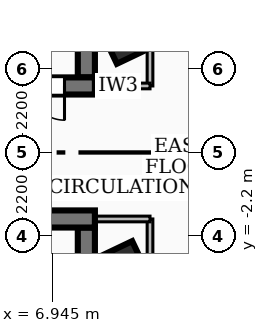
"""IFC4 building model, lengths in metres.
Left out: names, types, materials, properties, quantities, classifications, styles, units other than length and angle.
Written with IfcOpenShell. Run it as: python <this file> out.ifc"""

import sys

from ifc_helpers import new_model, si_unit, direction, frame, frame_2d, origin, origin_2d, place, context, subcontext, project, spatial, rectangle, extrude, element, fill, save


model = new_model("IFC4")
c1 = context("Model", 3, precision=1e-05, world=origin(), true_north=direction((0.0, 1.0)))
c2 = subcontext(c1, "Body", "Model", "MODEL_VIEW")
j1 = project(units=[si_unit("LENGTHUNIT", "METRE"), si_unit("PLANEANGLEUNIT", "RADIAN")], contexts=[c1])
p1 = place(None, origin())
s1 = spatial("IfcSite", under=j1, at=p1, CompositionType="ELEMENT")
p2 = place(p1, origin())
s2 = spatial("IfcBuilding", under=s1, at=p2, CompositionType="ELEMENT")
p3 = place(p2, frame((0.0, 0.0, 188.28)))
s3 = spatial("IfcBuildingStorey", under=s2, at=p3, CompositionType="ELEMENT", Elevation=188.28)
p4 = place(p3, frame((8.07, 1.75, 0.0), z_axis=(0.0, 0.0, 1.0), x_axis=(-1.0, 0.0, 0.0)))
e1 = element("IfcWall", 1, at=p4, inside=s3, PredefinedType="SHEAR", context=c2, shape_type="SweptSolid", body=[
    extrude(rectangle(XDim=16.14, YDim=0.45, at=frame_2d((8.07, 0.0))), origin(), (0.0, 0.0, 1.0), 4.06),
])
p5 = place(p4, frame((7.45, 0.0, 0.0)))
e2 = element("IfcOpeningElement", 2, at=p5, cuts=e1, PredefinedType="OPENING", context=c2, shape_type="SweptSolid", body=[
    extrude(rectangle(XDim=1.0, YDim=2.1, at=frame_2d((0.5, 1.05))), frame((0.0, 0.235, 0.0), z_axis=(0.0, -1.0, 0.0), x_axis=(1.0, 0.0, 0.0)), (0.0, 0.0, 1.0), 0.47),
])
p6 = place(p4, frame((3.85, 0.0, 0.0)))
e3 = element("IfcOpeningElement", 3, at=p6, cuts=e1, PredefinedType="OPENING", context=c2, shape_type="SweptSolid", body=[
    extrude(rectangle(XDim=0.9, YDim=2.06, at=frame_2d((0.45, 1.03))), frame((0.0, 0.235, 0.0), z_axis=(0.0, -1.0, 0.0), x_axis=(1.0, 0.0, 0.0)), (0.0, 0.0, 1.0), 0.47),
])
p7 = place(p4, frame((2.35, 0.0, 0.0)))
e4 = element("IfcOpeningElement", 4, at=p7, cuts=e1, PredefinedType="OPENING", context=c2, shape_type="SweptSolid", body=[
    extrude(rectangle(XDim=0.9, YDim=2.06, at=frame_2d((0.45, 1.03))), frame((0.0, 0.235, 0.0), z_axis=(0.0, -1.0, 0.0), x_axis=(1.0, 0.0, 0.0)), (0.0, 0.0, 1.0), 0.47),
])
p8 = place(p4, frame((0.8, 0.0, 0.0)))
e5 = element("IfcOpeningElement", 5, at=p8, cuts=e1, PredefinedType="OPENING", context=c2, shape_type="SweptSolid", body=[
    extrude(rectangle(XDim=0.9, YDim=2.06, at=frame_2d((0.45, 1.03))), frame((0.0, 0.235, 0.0), z_axis=(0.0, -1.0, 0.0), x_axis=(1.0, 0.0, 0.0)), (0.0, 0.0, 1.0), 0.47),
])
p9 = place(p3, frame((7.845, 8.31, 0.0), z_axis=(0.0, 0.0, 1.0), x_axis=(0.0, -1.0, 0.0)))
e6 = element("IfcWall", 6, at=p9, inside=s3, PredefinedType="SHEAR", context=c2, shape_type="SweptSolid", body=[
    extrude(rectangle(XDim=6.335, YDim=0.45, at=frame_2d((3.167, 0.0))), origin(), (0.0, 0.0, 1.0), 4.06),
])
p10 = place(p3, frame((-8.07, -1.75, 0.0), z_axis=(0.0, 0.0, 1.0), x_axis=(1.0, 0.0, 0.0)))
e7 = element("IfcWall", 7, at=p10, inside=s3, PredefinedType="SHEAR", context=c2, shape_type="SweptSolid", body=[
    extrude(rectangle(XDim=16.14, YDim=0.45, at=frame_2d((8.07, 0.0))), origin(), (0.0, 0.0, 1.0), 4.06),
])
p11 = place(p10, frame((7.45, 0.0, 0.0)))
e8 = element("IfcOpeningElement", 8, at=p11, cuts=e7, PredefinedType="OPENING", context=c2, shape_type="SweptSolid", body=[
    extrude(rectangle(XDim=1.0, YDim=2.1, at=frame_2d((0.5, 1.05))), frame((0.0, 0.235, 0.0), z_axis=(0.0, -1.0, 0.0), x_axis=(1.0, 0.0, 0.0)), (0.0, 0.0, 1.0), 0.47),
])
p12 = place(p10, frame((12.65, 0.0, 0.0)))
e9 = element("IfcOpeningElement", 9, at=p12, cuts=e7, PredefinedType="OPENING", context=c2, shape_type="SweptSolid", body=[
    extrude(rectangle(XDim=0.9, YDim=2.06, at=frame_2d((0.45, 1.03))), frame((0.0, 0.235, 0.0), z_axis=(0.0, -1.0, 0.0), x_axis=(1.0, 0.0, 0.0)), (0.0, 0.0, 1.0), 0.47),
])
p13 = place(p10, frame((0.565, 0.0, 0.0)))
e10 = element("IfcOpeningElement", 10, at=p13, cuts=e7, PredefinedType="OPENING", context=c2, shape_type="SweptSolid", body=[
    extrude(rectangle(XDim=1.05, YDim=2.15, at=frame_2d((0.525, 1.075))), frame((0.0, 0.235, 0.0), z_axis=(0.0, -1.0, 0.0), x_axis=(1.0, 0.0, 0.0)), (0.0, 0.0, 1.0), 0.47),
])
p14 = place(p10, frame((2.125, 0.0, 0.0)))
e11 = element("IfcOpeningElement", 11, at=p14, cuts=e7, PredefinedType="OPENING", context=c2, shape_type="SweptSolid", body=[
    extrude(rectangle(XDim=1.05, YDim=2.15, at=frame_2d((0.525, 1.075))), frame((0.0, 0.235, 0.0), z_axis=(0.0, -1.0, 0.0), x_axis=(1.0, 0.0, 0.0)), (0.0, 0.0, 1.0), 0.47),
])
p15 = place(p10, frame((3.685, 0.0, 0.0)))
e12 = element("IfcOpeningElement", 12, at=p15, cuts=e7, PredefinedType="OPENING", context=c2, shape_type="SweptSolid", body=[
    extrude(rectangle(XDim=1.05, YDim=2.15, at=frame_2d((0.525, 1.075))), frame((0.0, 0.235, 0.0), z_axis=(0.0, -1.0, 0.0), x_axis=(1.0, 0.0, 0.0)), (0.0, 0.0, 1.0), 0.47),
])
p16 = place(p3, frame((7.845, -1.975, 0.0), z_axis=(0.0, 0.0, 1.0), x_axis=(0.0, -1.0, 0.0)))
e13 = element("IfcWall", 13, at=p16, inside=s3, PredefinedType="SHEAR", context=c2, shape_type="SweptSolid", body=[
    extrude(rectangle(XDim=6.335, YDim=0.45, at=frame_2d((3.167, 0.0))), origin(), (0.0, 0.0, 1.0), 4.06),
])
for number, where, z_axis, x_axis in (
    (14, (8.85, -2.9, 0.0), (0.0, 0.0, 1.0), (0.903, 0.43, 0.0)),
    (15, (8.85, 2.9, 0.0), (0.0, 0.0, 1.0), (0.903, 0.43, 0.0)),
):
    element("IfcColumn", number, at=place(p3, frame(where, z_axis=z_axis, x_axis=x_axis)), inside=s3, PredefinedType="COLUMN", context=c2, shape_type="SweptSolid", body=[
        extrude(rectangle(XDim=0.85, YDim=0.85, at=origin_2d()), origin(), (0.0, 0.0, 1.0), 4.32),
    ])
p17 = place(p3, frame((9.52, 1.75, 0.0), z_axis=(0.0, 0.0, 1.0), x_axis=(0.0, 1.0, 0.0)))
e16 = element("IfcWall", 16, at=p17, inside=s3, PredefinedType="PARTITIONING", context=c2, shape_type="SweptSolid", body=[
    extrude(rectangle(XDim=6.63, YDim=0.15, at=frame_2d((3.315, 0.0))), origin(), (0.0, 0.0, 1.0), 3.364),
])
p18 = place(p3, frame((7.85, 1.75, 0.0), z_axis=(0.0, 0.0, 1.0), x_axis=(1.0, 0.0, 0.0)))
e17 = element("IfcWall", 17, at=p18, inside=s3, PredefinedType="PARTITIONING", context=c2, shape_type="SweptSolid", body=[
    extrude(rectangle(XDim=1.67, YDim=0.15, at=frame_2d((0.835, 0.0))), origin(), (0.0, 0.0, 1.0), 3.29),
])
p19 = place(p3, frame((9.52, -8.38, 0.0), z_axis=(0.0, 0.0, 1.0), x_axis=(0.0, 1.0, 0.0)))
e18 = element("IfcWall", 18, at=p19, inside=s3, PredefinedType="PARTITIONING", context=c2, shape_type="SweptSolid", body=[
    extrude(rectangle(XDim=6.63, YDim=0.15, at=frame_2d((3.315, 0.0))), origin(), (0.0, 0.0, 1.0), 4.06),
])
p20 = place(p3, frame((7.85, -1.75, 0.0), z_axis=(0.0, 0.0, 1.0), x_axis=(1.0, 0.0, 0.0)))
e19 = element("IfcWall", 19, at=p20, inside=s3, PredefinedType="PARTITIONING", context=c2, shape_type="SweptSolid", body=[
    extrude(rectangle(XDim=1.67, YDim=0.15, at=frame_2d((0.835, 0.0))), origin(), (0.0, 0.0, 1.0), 3.29),
])
p21 = place(p3, frame((8.362, 15.677, 0.0), z_axis=(0.0, 0.0, 1.0), x_axis=(0.429924831179, -0.902864685064, 0.0)))
e20 = element("IfcWall", 20, at=p21, inside=s3, PredefinedType="PARTITIONING", context=c2, shape_type="SweptSolid", body=[
    extrude(rectangle(XDim=20.58, YDim=0.1, at=frame_2d((10.29, 0.0))), origin(), (0.0, 0.0, 1.0), 3.364),
])
p22 = place(p21, frame((9.96, 0.0, 0.0)))
e21 = element("IfcOpeningElement", 21, at=p22, cuts=e20, PredefinedType="OPENING", context=c2, shape_type="SweptSolid", body=[
    extrude(rectangle(XDim=1.2, YDim=2.1, at=frame_2d((0.6, 1.05))), frame((0.0, 0.06, 0.0), z_axis=(0.0, -1.0, 0.0), x_axis=(1.0, 0.0, 0.0)), (0.0, 0.0, 1.0), 0.12),
])
p23 = place(p8, origin())
e22 = element("IfcDoor", 22, at=p23, inside=s3, OperationType="SINGLE_SWING_LEFT", PredefinedType="DOOR", context=c2, shape_type="SweptSolid", body=[
    extrude(rectangle(XDim=0.9, YDim=2.06, at=frame_2d((0.45, 1.03))), frame((0.0, 0.025, 0.0), z_axis=(0.0, -1.0, 0.0), x_axis=(1.0, 0.0, 0.0)), (0.0, 0.0, 1.0), 0.05),
])
fill(e5, e22)
save(model, sys.argv[1])
